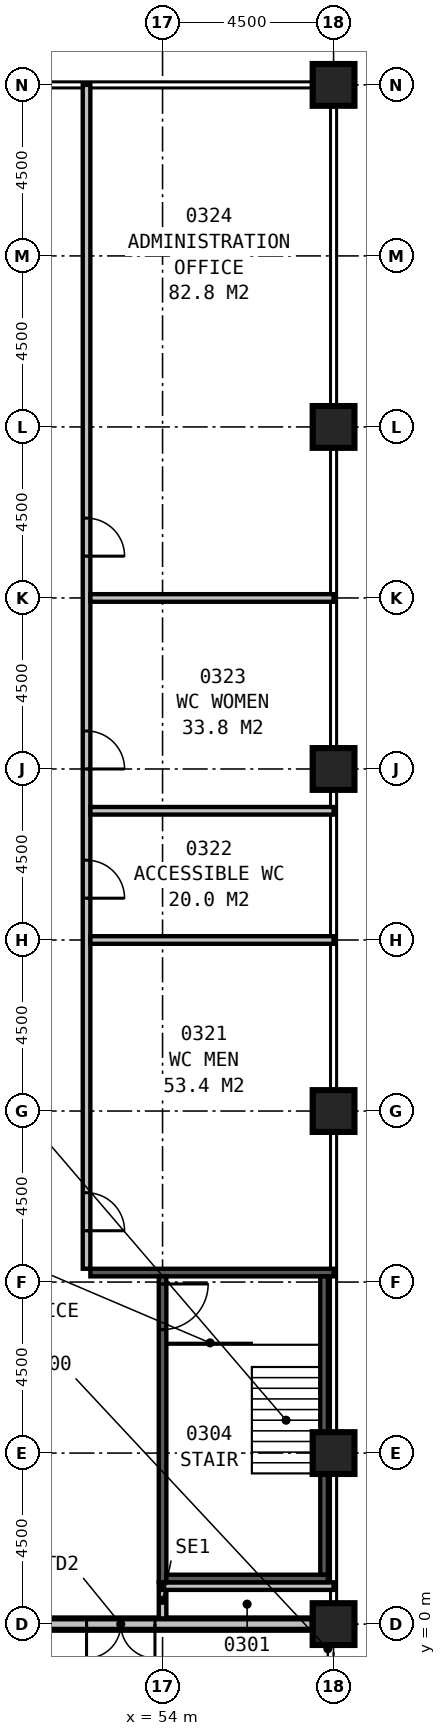
"""IFC4 building model, lengths in metres.
Left out: names, types, materials, properties, quantities, classifications, styles, units other than length and angle.
Written with IfcOpenShell. Run it as: python <this file> out.ifc"""

import sys

from ifc_helpers import new_model, si_unit, direction, frame, frame_2d, origin, origin_2d, place, context, subcontext, project, spatial, rectangle, extrude, element, fill, save


model = new_model("IFC4")
c1 = context("Model", 3, precision=1e-05, world=origin(), true_north=direction((0.0, 1.0)))
c2 = subcontext(c1, "Body", "Model", "MODEL_VIEW")
j1 = project(units=[si_unit("LENGTHUNIT", "METRE"), si_unit("PLANEANGLEUNIT", "RADIAN")], contexts=[c1])
p1 = place(None, origin())
s1 = spatial("IfcSite", under=j1, at=p1, CompositionType="ELEMENT")
p2 = place(p1, origin())
s2 = spatial("IfcBuilding", under=s1, at=p2, CompositionType="ELEMENT")
p3 = place(p2, frame((0.0, 0.0, 19.0)))
s3 = spatial("IfcBuildingStorey", under=s2, at=p3, CompositionType="ELEMENT", Elevation=19.0)
for number, where, z_axis, x_axis in (
    (1, (58.5, 4.5, 0.0), (0.0, 0.0, 1.0), (1.0, 0.0, 0.0)),
    (2, (58.5, 13.5, 0.0), (0.0, 0.0, 1.0), (1.0, 0.0, 0.0)),
    (3, (58.5, 22.5, 0.0), (0.0, 0.0, 1.0), (1.0, 0.0, 0.0)),
    (4, (58.5, 31.5, 0.0), (0.0, 0.0, 1.0), (1.0, 0.0, 0.0)),
    (5, (58.5, 40.5, 0.0), (0.0, 0.0, 1.0), (1.0, 0.0, 0.0)),
    (6, (58.5, 0.0, 0.0), (0.0, 0.0, 1.0), (1.0, 0.0, 0.0)),
):
    element("IfcColumn", number, at=place(p3, frame(where, z_axis=z_axis, x_axis=x_axis)), inside=s3, PredefinedType="COLUMN", context=c2, shape_type="SweptSolid", body=[
        extrude(rectangle(XDim=1.1, YDim=1.1, at=origin_2d()), origin(), (0.0, 0.0, 1.0), 5.0),
    ])
p4 = place(p3, frame((50.05, 0.0, 0.0), z_axis=(0.0, 0.0, 1.0), x_axis=(1.0, 0.0, 0.0)))
e7 = element("IfcWall", 7, at=p4, inside=s3, PredefinedType="STANDARD", context=c2, shape_type="SweptSolid", body=[
    extrude(rectangle(XDim=7.9, YDim=0.3, at=frame_2d((3.95, 0.0))), origin(), (0.0, 0.0, 1.0), 3.0),
])
p5 = place(p4, frame((3.75, 0.0, 0.0), z_axis=(0.0, 0.0, 1.0), x_axis=(-1.0, 0.0, 0.0)))
e8 = element("IfcOpeningElement", 8, at=p5, cuts=e7, PredefinedType="OPENING", context=c2, shape_type="SweptSolid", body=[
    extrude(rectangle(XDim=1.8, YDim=2.4, at=frame_2d((0.9, 1.2))), frame((0.0, 0.16, 0.0), z_axis=(0.0, -1.0, 0.0), x_axis=(1.0, 0.0, 0.0)), (0.0, 0.0, 1.0), 0.32),
])
p6 = place(p3, frame((54.0, 1.1, 0.0), z_axis=(0.0, 0.0, 1.0), x_axis=(0.0, 1.0, 0.0)))
e9 = element("IfcWall", 9, at=p6, inside=s3, PredefinedType="SOLIDWALL", context=c2, shape_type="SweptSolid", body=[
    extrude(rectangle(XDim=8.05, YDim=0.2, at=frame_2d((4.025, 0.0))), origin(), (0.0, 0.0, 1.0), 4.7),
])
p7 = place(p6, frame((7.85, 0.0, 0.0), z_axis=(0.0, 0.0, 1.0), x_axis=(-1.0, 0.0, 0.0)))
e10 = element("IfcOpeningElement", 10, at=p7, cuts=e9, PredefinedType="OPENING", context=c2, shape_type="SweptSolid", body=[
    extrude(rectangle(XDim=1.2, YDim=2.1, at=frame_2d((0.6, 1.05))), frame((0.0, 0.11, 0.0), z_axis=(0.0, -1.0, 0.0), x_axis=(1.0, 0.0, 0.0)), (0.0, 0.0, 1.0), 0.22),
])
p8 = place(p3, frame((52.1, 9.25, 0.0), z_axis=(0.0, 0.0, 1.0), x_axis=(1.0, 0.0, 0.0)))
e11 = element("IfcWall", 11, at=p8, inside=s3, PredefinedType="SOLIDWALL", context=c2, shape_type="SweptSolid", body=[
    extrude(rectangle(XDim=6.4, YDim=0.2, at=frame_2d((3.2, 0.0))), origin(), (0.0, 0.0, 1.0), 4.7),
])
p9 = place(p3, frame((54.0, 1.0, 0.0), z_axis=(0.0, 0.0, 1.0), x_axis=(1.0, 0.0, 0.0)))
e12 = element("IfcWall", 12, at=p9, inside=s3, PredefinedType="SOLIDWALL", context=c2, shape_type="SweptSolid", body=[
    extrude(rectangle(XDim=4.5, YDim=0.2, at=frame_2d((2.25, 0.0))), origin(), (0.0, 0.0, 1.0), 4.7),
])
p10 = place(p3, frame((54.0, 0.15, 0.0), z_axis=(0.0, 0.0, 1.0), x_axis=(0.0, 1.0, 0.0)))
e13 = element("IfcWall", 13, at=p10, inside=s3, PredefinedType="SOLIDWALL", context=c2, shape_type="SweptSolid", body=[
    extrude(rectangle(XDim=0.95, YDim=0.2, at=frame_2d((0.475, 0.0))), origin(), (0.0, 0.0, 1.0), 4.7),
])
p11 = place(p3, frame((54.1, 1.2, 0.0), z_axis=(0.0, 0.0, 1.0), x_axis=(1.0, 0.0, 0.0)))
e14 = element("IfcWall", 14, at=p11, inside=s3, PredefinedType="SOLIDWALL", context=c2, shape_type="SweptSolid", body=[
    extrude(rectangle(XDim=4.25, YDim=0.2, at=frame_2d((2.125, 0.0))), origin(), (0.0, 0.0, 1.0), 4.7),
])
p12 = place(p3, frame((58.25, 1.3, 0.0), z_axis=(0.0, 0.0, 1.0), x_axis=(0.0, 1.0, 0.0)))
e15 = element("IfcWall", 15, at=p12, inside=s3, PredefinedType="SOLIDWALL", context=c2, shape_type="SweptSolid", body=[
    extrude(rectangle(XDim=2.65, YDim=0.2, at=frame_2d((1.325, 0.0))), origin(), (0.0, 0.0, 1.0), 3.7),
])
p13 = place(p3, frame((58.25, 5.05, 0.0), z_axis=(0.0, 0.0, 1.0), x_axis=(0.0, 1.0, 0.0)))
e16 = element("IfcWall", 16, at=p13, inside=s3, PredefinedType="SOLIDWALL", context=c2, shape_type="SweptSolid", body=[
    extrude(rectangle(XDim=4.1, YDim=0.2, at=frame_2d((2.05, 0.0))), origin(), (0.0, 0.0, 1.0), 3.0),
])
p14 = place(p3, frame((52.0, 9.35, 0.0), z_axis=(0.0, 0.0, 1.0), x_axis=(0.0, 1.0, 0.0)))
e17 = element("IfcWall", 17, at=p14, inside=s3, PredefinedType="PARTITIONING", context=c2, shape_type="SweptSolid", body=[
    extrude(rectangle(XDim=31.15, YDim=0.2, at=frame_2d((15.575, 0.0))), origin(), (0.0, 0.0, 1.0), 4.7),
])
p15 = place(p14, frame((2.0, 0.0, 0.0), z_axis=(0.0, 0.0, 1.0), x_axis=(-1.0, 0.0, 0.0)))
e18 = element("IfcOpeningElement", 18, at=p15, cuts=e17, PredefinedType="OPENING", context=c2, shape_type="SweptSolid", body=[
    extrude(rectangle(XDim=1.0, YDim=2.1, at=frame_2d((0.5, 1.05))), frame((0.0, 0.11, 0.0), z_axis=(0.0, -1.0, 0.0), x_axis=(1.0, 0.0, 0.0)), (0.0, 0.0, 1.0), 0.22),
])
p16 = place(p14, frame((10.75, 0.0, 0.0), z_axis=(0.0, 0.0, 1.0), x_axis=(-1.0, 0.0, 0.0)))
e19 = element("IfcOpeningElement", 19, at=p16, cuts=e17, PredefinedType="OPENING", context=c2, shape_type="SweptSolid", body=[
    extrude(rectangle(XDim=1.0, YDim=2.1, at=frame_2d((0.5, 1.05))), frame((0.0, 0.11, 0.0), z_axis=(0.0, -1.0, 0.0), x_axis=(1.0, 0.0, 0.0)), (0.0, 0.0, 1.0), 0.22),
])
p17 = place(p14, frame((14.15, 0.0, 0.0), z_axis=(0.0, 0.0, 1.0), x_axis=(-1.0, 0.0, 0.0)))
e20 = element("IfcOpeningElement", 20, at=p17, cuts=e17, PredefinedType="OPENING", context=c2, shape_type="SweptSolid", body=[
    extrude(rectangle(XDim=1.0, YDim=2.1, at=frame_2d((0.5, 1.05))), frame((0.0, 0.11, 0.0), z_axis=(0.0, -1.0, 0.0), x_axis=(1.0, 0.0, 0.0)), (0.0, 0.0, 1.0), 0.22),
])
p18 = place(p14, frame((19.75, 0.0, 0.0), z_axis=(0.0, 0.0, 1.0), x_axis=(-1.0, 0.0, 0.0)))
e21 = element("IfcOpeningElement", 21, at=p18, cuts=e17, PredefinedType="OPENING", context=c2, shape_type="SweptSolid", body=[
    extrude(rectangle(XDim=1.0, YDim=2.1, at=frame_2d((0.5, 1.05))), frame((0.0, 0.11, 0.0), z_axis=(0.0, -1.0, 0.0), x_axis=(1.0, 0.0, 0.0)), (0.0, 0.0, 1.0), 0.22),
])
for number, where, z_axis, x_axis in (
    (22, (52.1, 18.0, 0.0), (0.0, 0.0, 1.0), (1.0, 0.0, 0.0)),
    (23, (52.1, 21.4, 0.0), (0.0, 0.0, 1.0), (1.0, 0.0, 0.0)),
    (24, (52.1, 27.0, 0.0), (0.0, 0.0, 1.0), (1.0, 0.0, 0.0)),
):
    element("IfcWall", number, at=place(p3, frame(where, z_axis=z_axis, x_axis=x_axis)), inside=s3, PredefinedType="PARTITIONING", context=c2, shape_type="SweptSolid", body=[
        extrude(rectangle(XDim=6.4, YDim=0.2, at=frame_2d((3.2, 0.0))), origin(), (0.0, 0.0, 1.0), 4.7),
    ])
p19 = place(p5, origin())
e25 = element("IfcDoor", 25, at=p19, inside=s3, OperationType="DOUBLE_DOOR_SINGLE_SWING", PredefinedType="DOOR", context=c2, shape_type="SweptSolid", body=[
    extrude(rectangle(XDim=1.8, YDim=2.4, at=frame_2d((0.9, 1.2))), frame((0.0, 0.025, 0.0), z_axis=(0.0, -1.0, 0.0), x_axis=(1.0, 0.0, 0.0)), (0.0, 0.0, 1.0), 0.05),
])
fill(e8, e25)
p20 = place(p7, origin())
e26 = element("IfcDoor", 26, at=p20, inside=s3, OperationType="SINGLE_SWING_LEFT", PredefinedType="DOOR", context=c2, shape_type="SweptSolid", body=[
    extrude(rectangle(XDim=1.2, YDim=2.1, at=frame_2d((0.6, 1.05))), frame((0.0, 0.025, 0.0), z_axis=(0.0, -1.0, 0.0), x_axis=(1.0, 0.0, 0.0)), (0.0, 0.0, 1.0), 0.05),
])
fill(e10, e26)
p21 = place(p15, origin())
e27 = element("IfcDoor", 27, at=p21, inside=s3, OperationType="SINGLE_SWING_RIGHT", PredefinedType="DOOR", context=c2, shape_type="SweptSolid", body=[
    extrude(rectangle(XDim=1.0, YDim=2.1, at=frame_2d((0.5, 1.05))), frame((0.0, 0.025, 0.0), z_axis=(0.0, -1.0, 0.0), x_axis=(1.0, 0.0, 0.0)), (0.0, 0.0, 1.0), 0.05),
])
fill(e18, e27)
p22 = place(p16, origin())
e28 = element("IfcDoor", 28, at=p22, inside=s3, OperationType="SINGLE_SWING_RIGHT", PredefinedType="DOOR", context=c2, shape_type="SweptSolid", body=[
    extrude(rectangle(XDim=1.0, YDim=2.1, at=frame_2d((0.5, 1.05))), frame((0.0, 0.025, 0.0), z_axis=(0.0, -1.0, 0.0), x_axis=(1.0, 0.0, 0.0)), (0.0, 0.0, 1.0), 0.05),
])
fill(e19, e28)
p23 = place(p17, origin())
e29 = element("IfcDoor", 29, at=p23, inside=s3, OperationType="SINGLE_SWING_RIGHT", PredefinedType="DOOR", context=c2, shape_type="SweptSolid", body=[
    extrude(rectangle(XDim=1.0, YDim=2.1, at=frame_2d((0.5, 1.05))), frame((0.0, 0.025, 0.0), z_axis=(0.0, -1.0, 0.0), x_axis=(1.0, 0.0, 0.0)), (0.0, 0.0, 1.0), 0.05),
])
fill(e20, e29)
p24 = place(p18, origin())
e30 = element("IfcDoor", 30, at=p24, inside=s3, OperationType="SINGLE_SWING_RIGHT", PredefinedType="DOOR", context=c2, shape_type="SweptSolid", body=[
    extrude(rectangle(XDim=1.0, YDim=2.1, at=frame_2d((0.5, 1.05))), frame((0.0, 0.025, 0.0), z_axis=(0.0, -1.0, 0.0), x_axis=(1.0, 0.0, 0.0)), (0.0, 0.0, 1.0), 0.05),
])
fill(e21, e30)
save(model, sys.argv[1])
